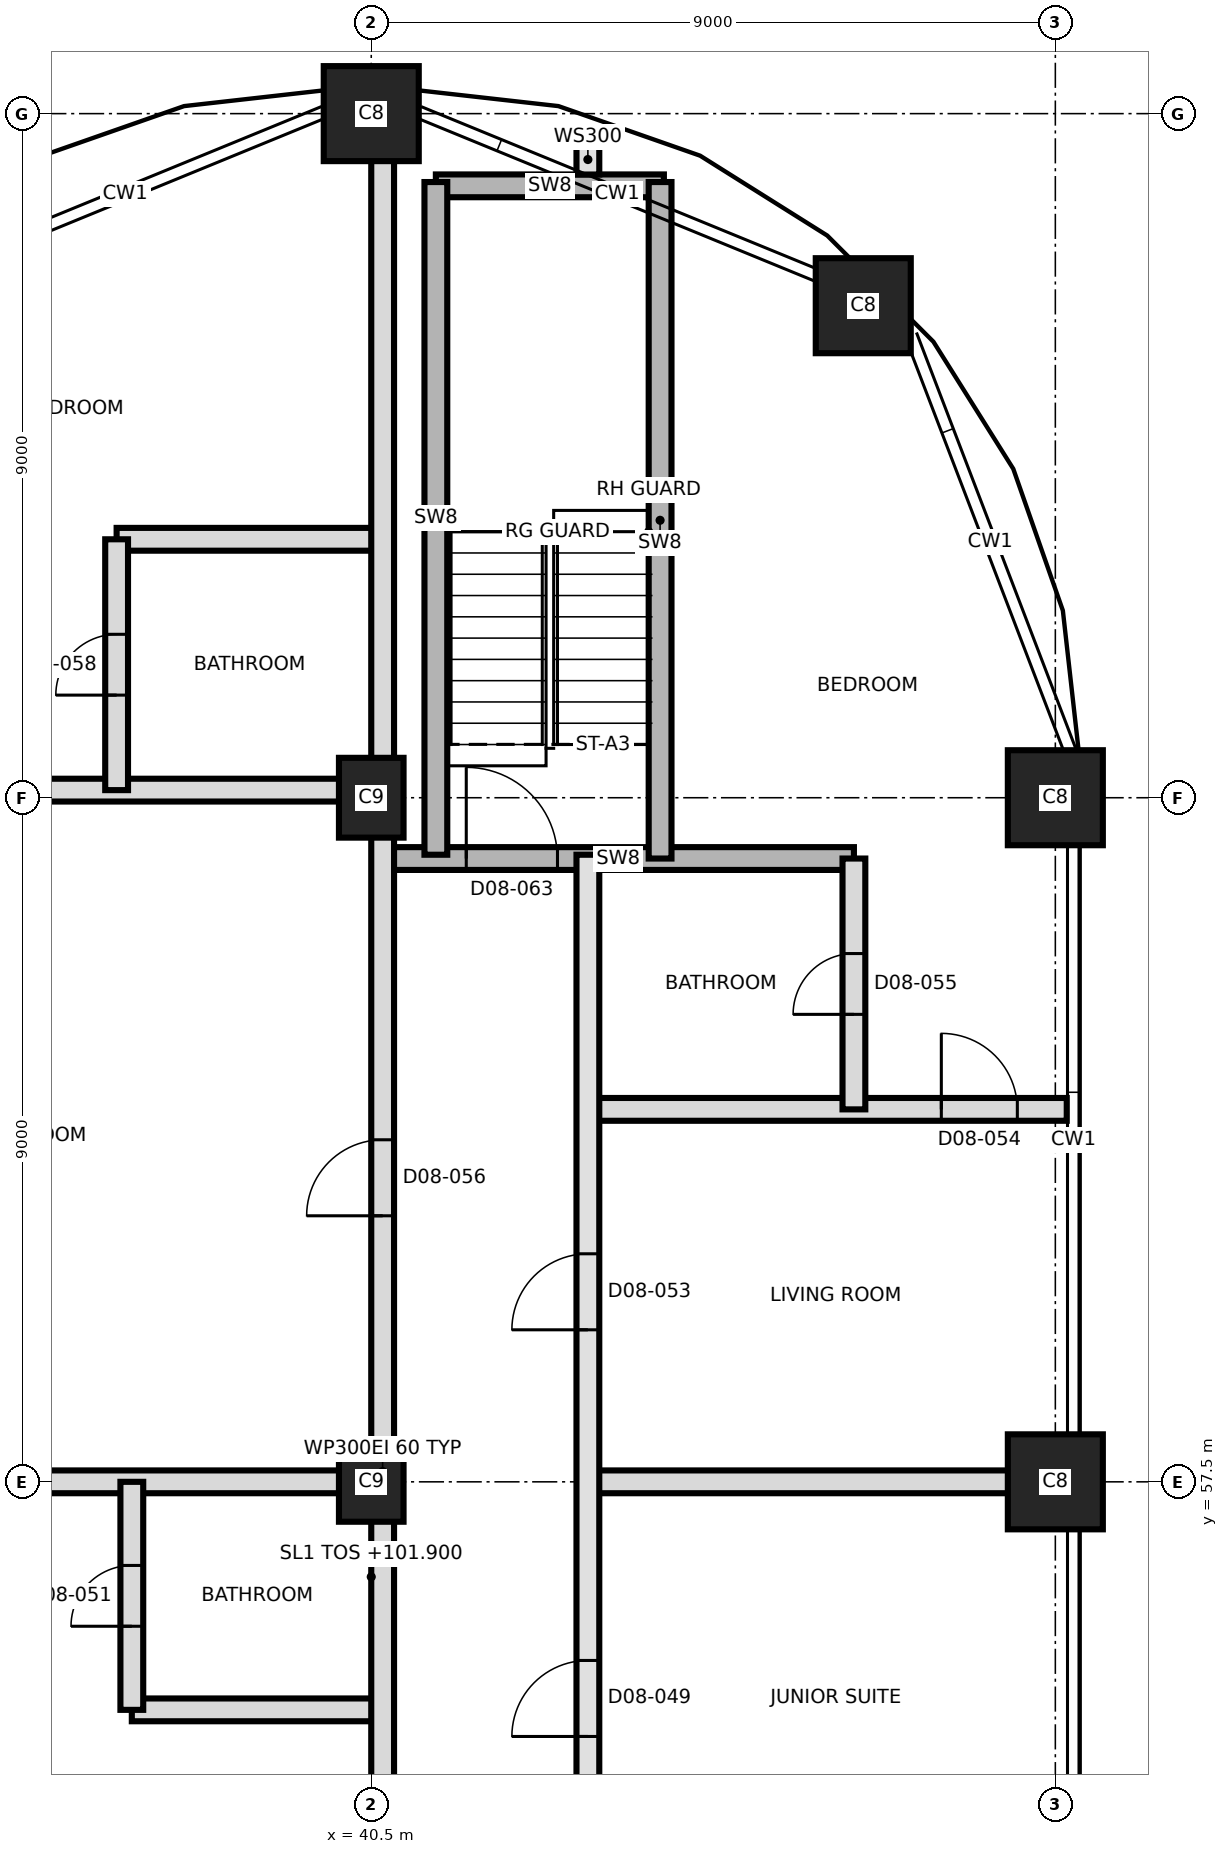
"""IFC4 building model, lengths in metres.
Left out: names, types, materials, properties, quantities, classifications, styles, units other than length and angle.
Written with IfcOpenShell. Run it as: python <this file> out.ifc"""

import sys

from ifc_helpers import new_model, si_unit, direction, frame, frame_2d, origin, origin_2d, place, context, subcontext, project, spatial, rectangle, extrude, element, fill, save


model = new_model("IFC4")
c1 = context("Model", 3, precision=1e-05, world=origin(), true_north=direction((0.0, 1.0)))
c2 = subcontext(c1, "Body", "Model", "MODEL_VIEW")
j1 = project(units=[si_unit("LENGTHUNIT", "METRE"), si_unit("PLANEANGLEUNIT", "RADIAN")], contexts=[c1])
p1 = place(None, origin())
s1 = spatial("IfcSite", under=j1, at=p1, CompositionType="ELEMENT")
p2 = place(p1, origin())
s2 = spatial("IfcBuilding", under=s1, at=p2, CompositionType="ELEMENT")
p3 = place(p2, frame((0.0, 0.0, 101.9)))
s3 = spatial("IfcBuildingStorey", under=s2, at=p3, CompositionType="ELEMENT", Elevation=101.9)
p4 = place(p3, frame((40.5, 57.5, 0.0), z_axis=(0.0, 0.0, 1.0), x_axis=(0.0, 1.0, 0.0)))
e1 = element("IfcColumn", 1, at=p4, inside=s3, PredefinedType="COLUMN", context=c2, shape_type="SweptSolid", body=[
    extrude(rectangle(XDim=1.05, YDim=0.85, at=origin_2d()), origin(), (0.0, 0.0, 1.0), 3.7),
])
p5 = place(p3, frame((49.5, 57.5, 0.0), z_axis=(0.0, 0.0, 1.0), x_axis=(1.0, 0.0, 0.0)))
e2 = element("IfcColumn", 2, at=p5, inside=s3, PredefinedType="COLUMN", context=c2, shape_type="SweptSolid", body=[
    extrude(rectangle(XDim=1.25, YDim=1.25, at=origin_2d()), origin(), (0.0, 0.0, 1.0), 3.7),
])
p6 = place(p3, frame((40.5, 66.5, 0.0), z_axis=(0.0, 0.0, 1.0), x_axis=(0.0, 1.0, 0.0)))
e3 = element("IfcColumn", 3, at=p6, inside=s3, PredefinedType="COLUMN", context=c2, shape_type="SweptSolid", body=[
    extrude(rectangle(XDim=1.05, YDim=0.85, at=origin_2d()), origin(), (0.0, 0.0, 1.0), 3.7),
])
for number, where, z_axis, x_axis in (
    (4, (49.5, 66.5, 0.0), (0.0, 0.0, 1.0), (1.0, 0.0, 0.0)),
    (5, (46.973, 72.973, 0.0), (0.0, 0.0, 1.0), (1.0, 0.0, 0.0)),
    (6, (40.5, 75.5, 0.0), (0.0, 0.0, 1.0), (1.0, 0.0, 0.0)),
):
    element("IfcColumn", number, at=place(p3, frame(where, z_axis=z_axis, x_axis=x_axis)), inside=s3, PredefinedType="COLUMN", context=c2, shape_type="SweptSolid", body=[
        extrude(rectangle(XDim=1.25, YDim=1.25, at=origin_2d()), origin(), (0.0, 0.0, 1.0), 3.7),
    ])
p7 = place(p3, frame((37.35, 54.5, 0.0), z_axis=(0.0, 0.0, 1.0), x_axis=(1.0, 0.0, 0.0)))
e7 = element("IfcWall", 7, at=p7, inside=s3, PredefinedType="PARTITIONING", context=c2, shape_type="SweptSolid", body=[
    extrude(rectangle(XDim=3.3, YDim=0.3, at=frame_2d((1.65, 0.0))), origin(), (0.0, 0.0, 1.0), 3.4),
])
p8 = place(p3, frame((31.53, 57.5, 0.0), z_axis=(0.0, 0.0, 1.0), x_axis=(1.0, 0.0, 0.0)))
e8 = element("IfcWall", 8, at=p8, inside=s3, PredefinedType="PARTITIONING", context=c2, shape_type="SweptSolid", body=[
    extrude(rectangle(XDim=9.12, YDim=0.3, at=frame_2d((4.56, 0.0))), origin(), (0.0, 0.0, 1.0), 3.4),
])
p9 = place(p3, frame((43.35, 57.5, 0.0), z_axis=(0.0, 0.0, 1.0), x_axis=(1.0, 0.0, 0.0)))
e9 = element("IfcWall", 9, at=p9, inside=s3, PredefinedType="PARTITIONING", context=c2, shape_type="SweptSolid", body=[
    extrude(rectangle(XDim=6.12, YDim=0.3, at=frame_2d((3.06, 0.0))), origin(), (0.0, 0.0, 1.0), 3.4),
])
p10 = place(p3, frame((43.35, 62.4, 0.0), z_axis=(0.0, 0.0, 1.0), x_axis=(1.0, 0.0, 0.0)))
e10 = element("IfcWall", 10, at=p10, inside=s3, PredefinedType="PARTITIONING", context=c2, shape_type="SweptSolid", body=[
    extrude(rectangle(XDim=6.3, YDim=0.3, at=frame_2d((3.15, 0.0))), origin(), (0.0, 0.0, 1.0), 3.4),
])
p11 = place(p10, frame((4.65, 0.0, 0.0)))
e11 = element("IfcOpeningElement", 11, at=p11, cuts=e10, PredefinedType="OPENING", context=c2, shape_type="SweptSolid", body=[
    extrude(rectangle(XDim=1.0, YDim=2.1, at=frame_2d((0.5, 1.05))), frame((0.0, 0.16, 0.0), z_axis=(0.0, -1.0, 0.0), x_axis=(1.0, 0.0, 0.0)), (0.0, 0.0, 1.0), 0.32),
])
p12 = place(p3, frame((40.65, 65.7, 0.0), z_axis=(0.0, 0.0, 1.0), x_axis=(1.0, 0.0, 0.0)))
e12 = element("IfcWall", 12, at=p12, inside=s3, PredefinedType="SHEAR", context=c2, shape_type="SweptSolid", body=[
    extrude(rectangle(XDim=6.2, YDim=0.3, at=frame_2d((3.1, 0.0))), origin(), (0.0, 0.0, 1.0), 3.4),
])
p13 = place(p12, frame((1.1, 0.0, 0.0)))
e13 = element("IfcOpeningElement", 13, at=p13, cuts=e12, PredefinedType="OPENING", context=c2, shape_type="SweptSolid", body=[
    extrude(rectangle(XDim=1.2, YDim=2.1, at=frame_2d((0.6, 1.05))), frame((0.0, 0.16, 0.0), z_axis=(0.0, -1.0, 0.0), x_axis=(1.0, 0.0, 0.0)), (0.0, 0.0, 1.0), 0.32),
])
p14 = place(p3, frame((31.53, 66.6, 0.0), z_axis=(0.0, 0.0, 1.0), x_axis=(1.0, 0.0, 0.0)))
e14 = element("IfcWall", 14, at=p14, inside=s3, PredefinedType="PARTITIONING", context=c2, shape_type="SweptSolid", body=[
    extrude(rectangle(XDim=9.12, YDim=0.3, at=frame_2d((4.56, 0.0))), origin(), (0.0, 0.0, 1.0), 3.4),
])
p15 = place(p14, frame((3.47, 0.0, 0.0)))
e15 = element("IfcOpeningElement", 15, at=p15, cuts=e14, PredefinedType="OPENING", context=c2, shape_type="SweptSolid", body=[
    extrude(rectangle(XDim=1.0, YDim=2.1, at=frame_2d((0.5, 1.05))), frame((0.0, 0.16, 0.0), z_axis=(0.0, -1.0, 0.0), x_axis=(1.0, 0.0, 0.0)), (0.0, 0.0, 1.0), 0.32),
])
p16 = place(p3, frame((37.15, 69.9, 0.0), z_axis=(0.0, 0.0, 1.0), x_axis=(1.0, 0.0, 0.0)))
e16 = element("IfcWall", 16, at=p16, inside=s3, PredefinedType="PARTITIONING", context=c2, shape_type="SweptSolid", body=[
    extrude(rectangle(XDim=3.5, YDim=0.3, at=frame_2d((1.75, 0.0))), origin(), (0.0, 0.0, 1.0), 3.4),
])
p17 = place(p3, frame((41.35, 74.55, 0.0), z_axis=(0.0, 0.0, 1.0), x_axis=(1.0, 0.0, 0.0)))
e17 = element("IfcWall", 17, at=p17, inside=s3, PredefinedType="SHEAR", context=c2, shape_type="SweptSolid", body=[
    extrude(rectangle(XDim=3.0, YDim=0.3, at=frame_2d((1.5, 0.0))), origin(), (0.0, 0.0, 1.0), 3.4),
])
p18 = place(p3, frame((37.15, 66.6, 0.0), z_axis=(0.0, 0.0, 1.0), x_axis=(0.0, 1.0, 0.0)))
e18 = element("IfcWall", 18, at=p18, inside=s3, PredefinedType="PARTITIONING", context=c2, shape_type="SweptSolid", body=[
    extrude(rectangle(XDim=3.3, YDim=0.3, at=frame_2d((1.65, 0.0))), origin(), (0.0, 0.0, 1.0), 3.4),
])
p19 = place(p18, frame((1.25, 0.0, 0.0)))
e19 = element("IfcOpeningElement", 19, at=p19, cuts=e18, PredefinedType="OPENING", context=c2, shape_type="SweptSolid", body=[
    extrude(rectangle(XDim=0.8, YDim=2.1, at=frame_2d((0.4, 1.05))), frame((0.0, 0.16, 0.0), z_axis=(0.0, -1.0, 0.0), x_axis=(1.0, 0.0, 0.0)), (0.0, 0.0, 1.0), 0.32),
])
p20 = place(p3, frame((37.35, 54.5, 0.0), z_axis=(0.0, 0.0, 1.0), x_axis=(0.0, 1.0, 0.0)))
e20 = element("IfcWall", 20, at=p20, inside=s3, PredefinedType="PARTITIONING", context=c2, shape_type="SweptSolid", body=[
    extrude(rectangle(XDim=3.0, YDim=0.3, at=frame_2d((1.5, 0.0))), origin(), (0.0, 0.0, 1.0), 3.4),
])
p21 = place(p20, frame((1.1, 0.0, 0.0)))
e21 = element("IfcOpeningElement", 21, at=p21, cuts=e20, PredefinedType="OPENING", context=c2, shape_type="SweptSolid", body=[
    extrude(rectangle(XDim=0.8, YDim=2.1, at=frame_2d((0.4, 1.05))), frame((0.0, 0.16, 0.0), z_axis=(0.0, -1.0, 0.0), x_axis=(1.0, 0.0, 0.0)), (0.0, 0.0, 1.0), 0.32),
])
p22 = place(p3, frame((40.65, 39.8, 0.0), z_axis=(0.0, 0.0, 1.0), x_axis=(0.0, 1.0, 0.0)))
e22 = element("IfcWall", 22, at=p22, inside=s3, PredefinedType="PARTITIONING", context=c2, shape_type="SweptSolid", body=[
    extrude(rectangle(XDim=35.67, YDim=0.3, at=frame_2d((17.835, 0.0))), origin(), (0.0, 0.0, 1.0), 3.4),
])
p23 = place(p22, frame((3.7, 0.0, 0.0)))
e23 = element("IfcOpeningElement", 23, at=p23, cuts=e22, PredefinedType="OPENING", context=c2, shape_type="SweptSolid", body=[
    extrude(rectangle(XDim=1.0, YDim=2.4, at=frame_2d((0.5, 1.2))), frame((0.0, 0.16, 0.0), z_axis=(0.0, -1.0, 0.0), x_axis=(1.0, 0.0, 0.0)), (0.0, 0.0, 1.0), 0.32),
])
p24 = place(p22, frame((12.7, 0.0, 0.0)))
e24 = element("IfcOpeningElement", 24, at=p24, cuts=e22, PredefinedType="OPENING", context=c2, shape_type="SweptSolid", body=[
    extrude(rectangle(XDim=1.0, YDim=2.4, at=frame_2d((0.5, 1.2))), frame((0.0, 0.16, 0.0), z_axis=(0.0, -1.0, 0.0), x_axis=(1.0, 0.0, 0.0)), (0.0, 0.0, 1.0), 0.32),
])
p25 = place(p22, frame((21.2, 0.0, 0.0)))
e25 = element("IfcOpeningElement", 25, at=p25, cuts=e22, PredefinedType="OPENING", context=c2, shape_type="SweptSolid", body=[
    extrude(rectangle(XDim=1.0, YDim=2.4, at=frame_2d((0.5, 1.2))), frame((0.0, 0.16, 0.0), z_axis=(0.0, -1.0, 0.0), x_axis=(1.0, 0.0, 0.0)), (0.0, 0.0, 1.0), 0.32),
])
p26 = place(p3, frame((41.35, 65.75, 0.0), z_axis=(0.0, 0.0, 1.0), x_axis=(0.0, 1.0, 0.0)))
e26 = element("IfcWall", 26, at=p26, inside=s3, PredefinedType="SHEAR", context=c2, shape_type="SweptSolid", body=[
    extrude(rectangle(XDim=8.85, YDim=0.3, at=frame_2d((4.425, 0.0))), origin(), (0.0, 0.0, 1.0), 3.4),
])
p27 = place(p3, frame((43.35, 39.8, 0.0), z_axis=(0.0, 0.0, 1.0), x_axis=(0.0, 1.0, 0.0)))
e27 = element("IfcWall", 27, at=p27, inside=s3, PredefinedType="SOLIDWALL", context=c2, shape_type="SweptSolid", body=[
    extrude(rectangle(XDim=25.95, YDim=0.3, at=frame_2d((12.975, 0.0))), origin(), (0.0, 0.0, 1.0), 3.4),
])
p28 = place(p27, frame((2.95, 0.0, 0.0)))
e28 = element("IfcOpeningElement", 28, at=p28, cuts=e27, PredefinedType="OPENING", context=c2, shape_type="SweptSolid", body=[
    extrude(rectangle(XDim=1.0, YDim=2.1, at=frame_2d((0.5, 1.05))), frame((0.0, 0.16, 0.0), z_axis=(0.0, -1.0, 0.0), x_axis=(1.0, 0.0, 0.0)), (0.0, 0.0, 1.0), 0.32),
])
p29 = place(p27, frame((4.6, 0.0, 0.0)))
e29 = element("IfcOpeningElement", 29, at=p29, cuts=e27, PredefinedType="OPENING", context=c2, shape_type="SweptSolid", body=[
    extrude(rectangle(XDim=1.0, YDim=2.1, at=frame_2d((0.5, 1.05))), frame((0.0, 0.16, 0.0), z_axis=(0.0, -1.0, 0.0), x_axis=(1.0, 0.0, 0.0)), (0.0, 0.0, 1.0), 0.32),
])
p30 = place(p27, frame((14.35, 0.0, 0.0)))
e30 = element("IfcOpeningElement", 30, at=p30, cuts=e27, PredefinedType="OPENING", context=c2, shape_type="SweptSolid", body=[
    extrude(rectangle(XDim=1.0, YDim=2.4, at=frame_2d((0.5, 1.2))), frame((0.0, 0.16, 0.0), z_axis=(0.0, -1.0, 0.0), x_axis=(1.0, 0.0, 0.0)), (0.0, 0.0, 1.0), 0.32),
])
p31 = place(p27, frame((19.7, 0.0, 0.0)))
e31 = element("IfcOpeningElement", 31, at=p31, cuts=e27, PredefinedType="OPENING", context=c2, shape_type="SweptSolid", body=[
    extrude(rectangle(XDim=1.0, YDim=2.4, at=frame_2d((0.5, 1.2))), frame((0.0, 0.16, 0.0), z_axis=(0.0, -1.0, 0.0), x_axis=(1.0, 0.0, 0.0)), (0.0, 0.0, 1.0), 0.32),
])
p32 = place(p3, frame((43.35, 74.699, 0.0), z_axis=(0.0, 0.0, 1.0), x_axis=(0.0, 1.0, 0.0)))
e32 = element("IfcWall", 32, at=p32, inside=s3, PredefinedType="SOLIDWALL", context=c2, shape_type="SweptSolid", body=[
    extrude(rectangle(XDim=0.394, YDim=0.3, at=frame_2d((0.197, 0.0))), origin(), (0.0, 0.0, 1.0), 3.4),
])
p33 = place(p3, frame((44.3, 65.7, 0.0), z_axis=(0.0, 0.0, 1.0), x_axis=(0.0, 1.0, 0.0)))
e33 = element("IfcWall", 33, at=p33, inside=s3, PredefinedType="SHEAR", context=c2, shape_type="SweptSolid", body=[
    extrude(rectangle(XDim=8.9, YDim=0.3, at=frame_2d((4.45, 0.0))), origin(), (0.0, 0.0, 1.0), 3.4),
])
p34 = place(p3, frame((46.85, 62.4, 0.0), z_axis=(0.0, 0.0, 1.0), x_axis=(0.0, 1.0, 0.0)))
e34 = element("IfcWall", 34, at=p34, inside=s3, PredefinedType="PARTITIONING", context=c2, shape_type="SweptSolid", body=[
    extrude(rectangle(XDim=3.3, YDim=0.3, at=frame_2d((1.65, 0.0))), origin(), (0.0, 0.0, 1.0), 3.4),
])
p35 = place(p34, frame((1.25, 0.0, 0.0)))
e35 = element("IfcOpeningElement", 35, at=p35, cuts=e34, PredefinedType="OPENING", context=c2, shape_type="SweptSolid", body=[
    extrude(rectangle(XDim=0.8, YDim=2.1, at=frame_2d((0.4, 1.05))), frame((0.0, 0.16, 0.0), z_axis=(0.0, -1.0, 0.0), x_axis=(1.0, 0.0, 0.0)), (0.0, 0.0, 1.0), 0.32),
])
p36 = place(p30, origin())
e36 = element("IfcDoor", 36, at=p36, inside=s3, OperationType="SINGLE_SWING_RIGHT", PredefinedType="DOOR", context=c2, shape_type="SweptSolid", body=[
    extrude(rectangle(XDim=1.0, YDim=2.4, at=frame_2d((0.5, 1.2))), frame((0.0, 0.025, 0.0), z_axis=(0.0, -1.0, 0.0), x_axis=(1.0, 0.0, 0.0)), (0.0, 0.0, 1.0), 0.05),
])
fill(e30, e36)
p37 = place(p21, origin())
e37 = element("IfcDoor", 37, at=p37, inside=s3, OperationType="SINGLE_SWING_LEFT", PredefinedType="DOOR", context=c2, shape_type="SweptSolid", body=[
    extrude(rectangle(XDim=0.8, YDim=2.1, at=frame_2d((0.4, 1.05))), frame((0.0, 0.025, 0.0), z_axis=(0.0, -1.0, 0.0), x_axis=(1.0, 0.0, 0.0)), (0.0, 0.0, 1.0), 0.05),
])
fill(e21, e37)
p38 = place(p31, origin())
e38 = element("IfcDoor", 38, at=p38, inside=s3, OperationType="SINGLE_SWING_LEFT", PredefinedType="DOOR", context=c2, shape_type="SweptSolid", body=[
    extrude(rectangle(XDim=1.0, YDim=2.4, at=frame_2d((0.5, 1.2))), frame((0.0, 0.025, 0.0), z_axis=(0.0, -1.0, 0.0), x_axis=(1.0, 0.0, 0.0)), (0.0, 0.0, 1.0), 0.05),
])
fill(e31, e38)
p39 = place(p11, origin())
e39 = element("IfcDoor", 39, at=p39, inside=s3, OperationType="SINGLE_SWING_RIGHT", PredefinedType="DOOR", context=c2, shape_type="SweptSolid", body=[
    extrude(rectangle(XDim=1.0, YDim=2.1, at=frame_2d((0.5, 1.05))), frame((0.0, 0.025, 0.0), z_axis=(0.0, -1.0, 0.0), x_axis=(1.0, 0.0, 0.0)), (0.0, 0.0, 1.0), 0.05),
])
fill(e11, e39)
p40 = place(p35, origin())
e40 = element("IfcDoor", 40, at=p40, inside=s3, OperationType="SINGLE_SWING_LEFT", PredefinedType="DOOR", context=c2, shape_type="SweptSolid", body=[
    extrude(rectangle(XDim=0.8, YDim=2.1, at=frame_2d((0.4, 1.05))), frame((0.0, 0.025, 0.0), z_axis=(0.0, -1.0, 0.0), x_axis=(1.0, 0.0, 0.0)), (0.0, 0.0, 1.0), 0.05),
])
fill(e35, e40)
p41 = place(p25, origin())
e41 = element("IfcDoor", 41, at=p41, inside=s3, OperationType="SINGLE_SWING_LEFT", PredefinedType="DOOR", context=c2, shape_type="SweptSolid", body=[
    extrude(rectangle(XDim=1.0, YDim=2.4, at=frame_2d((0.5, 1.2))), frame((0.0, 0.025, 0.0), z_axis=(0.0, -1.0, 0.0), x_axis=(1.0, 0.0, 0.0)), (0.0, 0.0, 1.0), 0.05),
])
fill(e25, e41)
p42 = place(p19, origin())
e42 = element("IfcDoor", 42, at=p42, inside=s3, OperationType="SINGLE_SWING_LEFT", PredefinedType="DOOR", context=c2, shape_type="SweptSolid", body=[
    extrude(rectangle(XDim=0.8, YDim=2.1, at=frame_2d((0.4, 1.05))), frame((0.0, 0.025, 0.0), z_axis=(0.0, -1.0, 0.0), x_axis=(1.0, 0.0, 0.0)), (0.0, 0.0, 1.0), 0.05),
])
fill(e19, e42)
p43 = place(p13, origin())
e43 = element("IfcDoor", 43, at=p43, inside=s3, OperationType="SINGLE_SWING_RIGHT", PredefinedType="DOOR", context=c2, shape_type="SweptSolid", body=[
    extrude(rectangle(XDim=1.2, YDim=2.1, at=frame_2d((0.6, 1.05))), frame((0.0, 0.025, 0.0), z_axis=(0.0, -1.0, 0.0), x_axis=(1.0, 0.0, 0.0)), (0.0, 0.0, 1.0), 0.05),
])
fill(e13, e43)
save(model, sys.argv[1])
